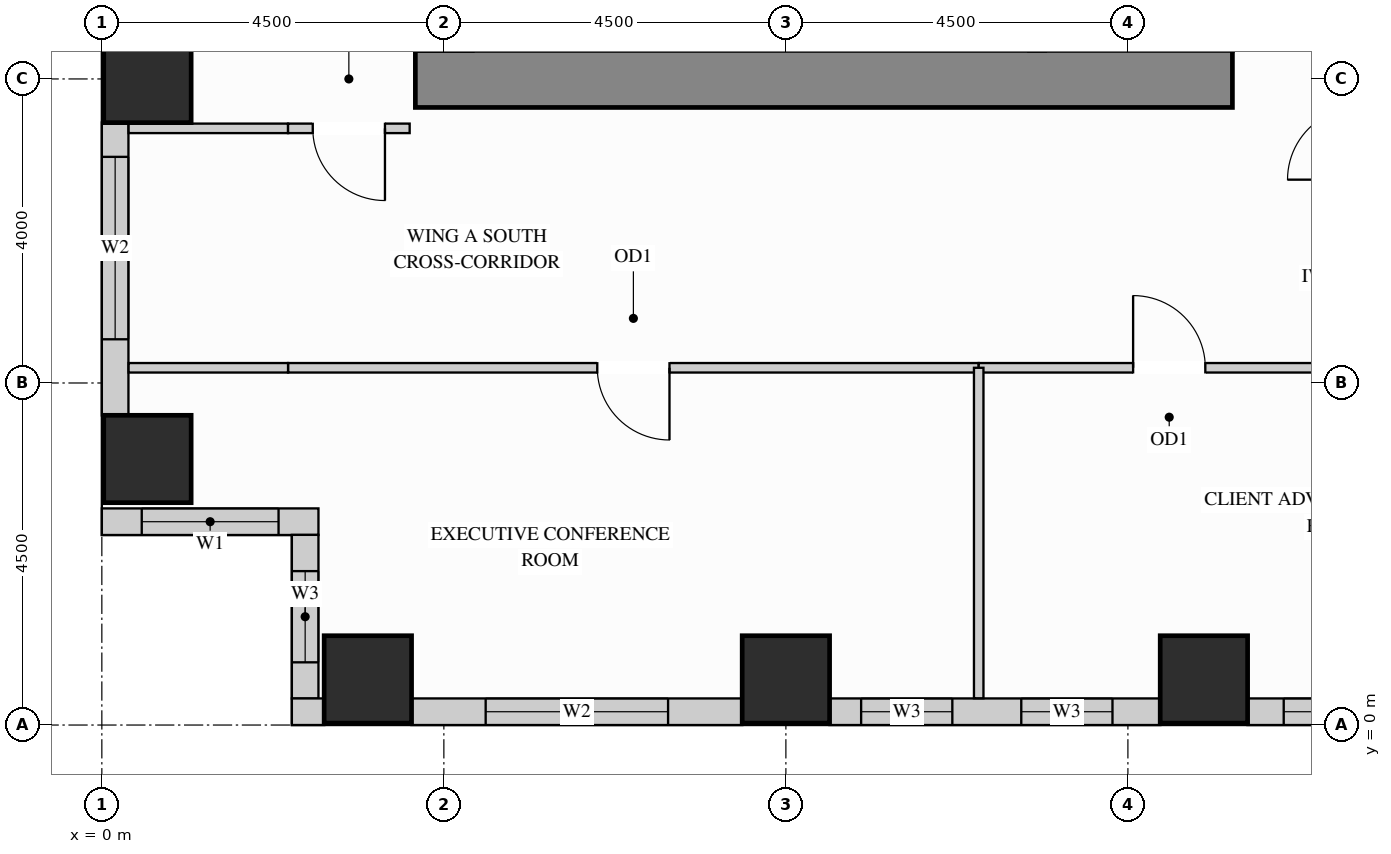
"""IFC4 building model, lengths in metres.
Left out: names, types, materials, properties, quantities, classifications, styles, units other than length and angle.
Written with IfcOpenShell. Run it as: python <this file> out.ifc"""

import sys

from ifc_helpers import new_model, si_unit, direction, frame, frame_2d, origin, origin_2d, place, context, subcontext, project, spatial, rectangle, extrude, source, transform, mapped, element, fill, save


model = new_model("IFC4")
c1 = context("Model", 3, precision=1e-05, world=origin(), true_north=direction((0.0, 1.0)))
c2 = subcontext(c1, "Body", "Model", "MODEL_VIEW")
j1 = project(units=[si_unit("LENGTHUNIT", "METRE"), si_unit("PLANEANGLEUNIT", "RADIAN")], contexts=[c1])
p1 = place(None, origin())
s1 = spatial("IfcSite", under=j1, at=p1, CompositionType="ELEMENT")
p2 = place(p1, origin())
s2 = spatial("IfcBuilding", under=s1, at=p2, CompositionType="ELEMENT")
p3 = place(p2, frame((0.0, 0.0, 124.2)))
s3 = spatial("IfcBuildingStorey", under=s2, at=p3, CompositionType="ELEMENT", Elevation=124.2)
m1 = source(origin(), c2, "Body", "SweptSolid", [
    extrude(rectangle(XDim=1.15, YDim=1.15, at=origin_2d()), origin(), (0.0, 0.0, 1.0), 3.38),
])
for number, where, z_axis, x_axis in (
    (1, (14.5, 0.6, 0.0), (0.0, 0.0, 1.0), (1.0, 0.0, 0.0)),
    (2, (3.5, 0.6, 0.0), (0.0, 0.0, 1.0), (1.0, 0.0, 0.0)),
    (3, (9.0, 0.6, 0.0), (0.0, 0.0, 1.0), (1.0, 0.0, 0.0)),
    (4, (0.6, 3.5, 0.0), (0.0, 0.0, 1.0), (1.0, 0.0, 0.0)),
    (5, (0.6, 8.5, 0.0), (0.0, 0.0, 1.0), (1.0, 0.0, 0.0)),
):
    element("IfcColumn", number, at=place(p3, frame(where, z_axis=z_axis, x_axis=x_axis)), inside=s3, PredefinedType="COLUMN", context=c2, shape_type="MappedRepresentation", body=[
        mapped(m1, transform((0.0, 0.0, 0.0), x_axis=(1.0, 0.0, 0.0), y_axis=(0.0, 1.0, 0.0), z_axis=(0.0, 0.0, 1.0))),
    ])
m2 = source(origin(), c2, "Body", "SweptSolid", [
    extrude(rectangle(XDim=10.75, YDim=0.75, at=frame_2d((5.375, 0.0))), origin(), (0.0, 0.0, 1.0), 3.38),
])
p4 = place(p3, frame((4.125, 8.5, 0.0), z_axis=(0.0, 0.0, 1.0), x_axis=(1.0, 0.0, 0.0)))
e6 = element("IfcWall", 6, at=p4, inside=s3, PredefinedType="SHEAR", context=c2, shape_type="MappedRepresentation", body=[
    mapped(m2, transform((0.0, 0.0, 0.0), x_axis=(1.0, 0.0, 0.0), y_axis=(0.0, 1.0, 0.0), z_axis=(0.0, 0.0, 1.0))),
])
p5 = place(p3, frame((0.175, 7.927, 0.0), z_axis=(0.0, 0.0, 1.0), x_axis=(0.0, -1.0, 0.0)))
e7 = element("IfcWall", 7, at=p5, inside=s3, PredefinedType="SOLIDWALL", context=c2, shape_type="SweptSolid", body=[
    extrude(rectangle(XDim=3.854, YDim=0.35, at=frame_2d((1.927, 0.0))), origin(), (0.0, 0.0, 1.0), 3.365),
])
p6 = place(p5, frame((0.452, 0.0, 0.78)))
e8 = element("IfcOpeningElement", 8, at=p6, cuts=e7, PredefinedType="OPENING", context=c2, shape_type="SweptSolid", body=[
    extrude(rectangle(XDim=2.4, YDim=2.1, at=frame_2d((1.2, 1.05))), frame((0.0, 0.185, 0.0), z_axis=(0.0, -1.0, 0.0), x_axis=(1.0, 0.0, 0.0)), (0.0, 0.0, 1.0), 0.37),
])
p7 = place(p3, frame((0.0, 2.675, 0.0), z_axis=(0.0, 0.0, 1.0), x_axis=(1.0, 0.0, 0.0)))
e9 = element("IfcWall", 9, at=p7, inside=s3, PredefinedType="SOLIDWALL", context=c2, shape_type="SweptSolid", body=[
    extrude(rectangle(XDim=2.85, YDim=0.35, at=frame_2d((1.425, 0.0))), origin(), (0.0, 0.0, 1.0), 3.365),
])
p8 = place(p7, frame((0.525, 0.0, 0.78)))
e10 = element("IfcOpeningElement", 10, at=p8, cuts=e9, PredefinedType="OPENING", context=c2, shape_type="SweptSolid", body=[
    extrude(rectangle(XDim=1.8, YDim=2.1, at=frame_2d((0.9, 1.05))), frame((0.0, 0.185, 0.0), z_axis=(0.0, -1.0, 0.0), x_axis=(1.0, 0.0, 0.0)), (0.0, 0.0, 1.0), 0.37),
])
p9 = place(p3, frame((2.675, 2.502, 0.0), z_axis=(0.0, 0.0, 1.0), x_axis=(0.0, -1.0, 0.0)))
e11 = element("IfcWall", 11, at=p9, inside=s3, PredefinedType="SOLIDWALL", context=c2, shape_type="SweptSolid", body=[
    extrude(rectangle(XDim=2.154, YDim=0.35, at=frame_2d((1.077, 0.0))), origin(), (0.0, 0.0, 1.0), 3.365),
])
p10 = place(p9, frame((0.477, 0.0, 0.78)))
e12 = element("IfcOpeningElement", 12, at=p10, cuts=e11, PredefinedType="OPENING", context=c2, shape_type="SweptSolid", body=[
    extrude(rectangle(XDim=1.2, YDim=2.1, at=frame_2d((0.6, 1.05))), frame((0.0, 0.185, 0.0), z_axis=(0.0, -1.0, 0.0), x_axis=(1.0, 0.0, 0.0)), (0.0, 0.0, 1.0), 0.37),
])
m3 = source(origin(), c2, "Body", "SweptSolid", [
    extrude(rectangle(XDim=0.427, YDim=0.35, at=frame_2d((0.213, 0.0))), origin(), (0.0, 0.0, 1.0), 3.365),
])
p11 = place(p3, frame((2.5, 0.175, 0.0), z_axis=(0.0, 0.0, 1.0), x_axis=(1.0, 0.0, 0.0)))
e13 = element("IfcWall", 13, at=p11, inside=s3, PredefinedType="SOLIDWALL", context=c2, shape_type="MappedRepresentation", body=[
    mapped(m3, transform((0.0, 0.0, 0.0), x_axis=(1.0, 0.0, 0.0), y_axis=(0.0, 1.0, 0.0), z_axis=(0.0, 0.0, 1.0))),
])
p12 = place(p3, frame((4.073, 0.175, 0.0), z_axis=(0.0, 0.0, 1.0), x_axis=(1.0, 0.0, 0.0)))
e14 = element("IfcWall", 14, at=p12, inside=s3, PredefinedType="SOLIDWALL", context=c2, shape_type="SweptSolid", body=[
    extrude(rectangle(XDim=4.354, YDim=0.35, at=frame_2d((2.177, 0.0))), origin(), (0.0, 0.0, 1.0), 3.365),
])
p13 = place(p12, frame((0.977, 0.0, 0.78)))
e15 = element("IfcOpeningElement", 15, at=p13, cuts=e14, PredefinedType="OPENING", context=c2, shape_type="SweptSolid", body=[
    extrude(rectangle(XDim=2.4, YDim=2.1, at=frame_2d((1.2, 1.05))), frame((0.0, 0.185, 0.0), z_axis=(0.0, -1.0, 0.0), x_axis=(1.0, 0.0, 0.0)), (0.0, 0.0, 1.0), 0.37),
])
p14 = place(p3, frame((9.573, 0.175, 0.0), z_axis=(0.0, 0.0, 1.0), x_axis=(1.0, 0.0, 0.0)))
e16 = element("IfcWall", 16, at=p14, inside=s3, PredefinedType="SOLIDWALL", context=c2, shape_type="SweptSolid", body=[
    extrude(rectangle(XDim=4.354, YDim=0.35, at=frame_2d((2.177, 0.0))), origin(), (0.0, 0.0, 1.0), 3.365),
])
p15 = place(p14, frame((0.417, 0.0, 0.78)))
e17 = element("IfcOpeningElement", 17, at=p15, cuts=e16, PredefinedType="OPENING", context=c2, shape_type="SweptSolid", body=[
    extrude(rectangle(XDim=1.2, YDim=2.1, at=frame_2d((0.6, 1.05))), frame((0.0, 0.185, 0.0), z_axis=(0.0, -1.0, 0.0), x_axis=(1.0, 0.0, 0.0)), (0.0, 0.0, 1.0), 0.37),
])
p16 = place(p14, frame((2.524, 0.0, 0.78)))
e18 = element("IfcOpeningElement", 18, at=p16, cuts=e16, PredefinedType="OPENING", context=c2, shape_type="SweptSolid", body=[
    extrude(rectangle(XDim=1.2, YDim=2.1, at=frame_2d((0.6, 1.05))), frame((0.0, 0.185, 0.0), z_axis=(0.0, -1.0, 0.0), x_axis=(1.0, 0.0, 0.0)), (0.0, 0.0, 1.0), 0.37),
])
p17 = place(p3, frame((15.073, 0.175, 0.0), z_axis=(0.0, 0.0, 1.0), x_axis=(1.0, 0.0, 0.0)))
e19 = element("IfcWall", 19, at=p17, inside=s3, PredefinedType="SOLIDWALL", context=c2, shape_type="SweptSolid", body=[
    extrude(rectangle(XDim=3.354, YDim=0.35, at=frame_2d((1.677, 0.0))), origin(), (0.0, 0.0, 1.0), 3.365),
])
p18 = place(p17, frame((0.477, 0.0, 0.78)))
e20 = element("IfcOpeningElement", 20, at=p18, cuts=e19, PredefinedType="OPENING", context=c2, shape_type="SweptSolid", body=[
    extrude(rectangle(XDim=2.4, YDim=2.1, at=frame_2d((1.2, 1.05))), frame((0.0, 0.185, 0.0), z_axis=(0.0, -1.0, 0.0), x_axis=(1.0, 0.0, 0.0)), (0.0, 0.0, 1.0), 0.37),
])
m4 = source(origin(), c2, "Body", "SweptSolid", [
    extrude(rectangle(XDim=2.098, YDim=0.125, at=frame_2d((1.049, 0.0))), origin(), (0.0, 0.0, 1.0), 3.365),
])
p19 = place(p3, frame((0.352, 7.85, 0.0), z_axis=(0.0, 0.0, 1.0), x_axis=(1.0, 0.0, 0.0)))
e21 = element("IfcWall", 21, at=p19, inside=s3, PredefinedType="PARTITIONING", context=c2, shape_type="MappedRepresentation", body=[
    mapped(m4, transform((0.0, 0.0, 0.0), x_axis=(1.0, 0.0, 0.0), y_axis=(0.0, 1.0, 0.0), z_axis=(0.0, 0.0, 1.0))),
])
p20 = place(p3, frame((2.45, 7.85, 0.0), z_axis=(0.0, 0.0, 1.0), x_axis=(1.0, 0.0, 0.0)))
e22 = element("IfcWall", 22, at=p20, inside=s3, PredefinedType="PARTITIONING", context=c2, shape_type="SweptSolid", body=[
    extrude(rectangle(XDim=1.6, YDim=0.125, at=frame_2d((0.8, 0.0))), origin(), (0.0, 0.0, 1.0), 3.365),
])
p21 = place(p20, frame((0.325, 0.0, 0.0)))
e23 = element("IfcOpeningElement", 23, at=p21, cuts=e22, PredefinedType="OPENING", context=c2, shape_type="SweptSolid", body=[
    extrude(rectangle(XDim=0.95, YDim=2.15, at=frame_2d((0.475, 1.075))), frame((0.0, 0.073, 0.0), z_axis=(0.0, -1.0, 0.0), x_axis=(1.0, 0.0, 0.0)), (0.0, 0.0, 1.0), 0.145),
])
p22 = place(p3, frame((2.45, 4.7, 0.0), z_axis=(0.0, 0.0, 1.0), x_axis=(1.0, 0.0, 0.0)))
e24 = element("IfcWall", 24, at=p22, inside=s3, PredefinedType="PARTITIONING", context=c2, shape_type="SweptSolid", body=[
    extrude(rectangle(XDim=9.087, YDim=0.125, at=frame_2d((4.543, 0.0))), origin(), (0.0, 0.0, 1.0), 2.828),
])
p23 = place(p22, frame((4.069, 0.0, 0.0)))
e25 = element("IfcOpeningElement", 25, at=p23, cuts=e24, PredefinedType="OPENING", context=c2, shape_type="SweptSolid", body=[
    extrude(rectangle(XDim=0.95, YDim=2.15, at=frame_2d((0.475, 1.075))), frame((0.0, 0.073, 0.0), z_axis=(0.0, -1.0, 0.0), x_axis=(1.0, 0.0, 0.0)), (0.0, 0.0, 1.0), 0.145),
])
p24 = place(p3, frame((11.537, 4.7, 0.0), z_axis=(0.0, 0.0, 1.0), x_axis=(1.0, 0.0, 0.0)))
e26 = element("IfcWall", 26, at=p24, inside=s3, PredefinedType="PARTITIONING", context=c2, shape_type="SweptSolid", body=[
    extrude(rectangle(XDim=5.013, YDim=0.125, at=frame_2d((2.506, 0.0))), origin(), (0.0, 0.0, 1.0), 2.828),
])
p25 = place(p24, frame((2.031, 0.0, 0.0)))
e27 = element("IfcOpeningElement", 27, at=p25, cuts=e26, PredefinedType="OPENING", context=c2, shape_type="SweptSolid", body=[
    extrude(rectangle(XDim=0.95, YDim=2.15, at=frame_2d((0.475, 1.075))), frame((0.0, 0.073, 0.0), z_axis=(0.0, -1.0, 0.0), x_axis=(1.0, 0.0, 0.0)), (0.0, 0.0, 1.0), 0.145),
])
m5 = source(origin(), c2, "Body", "SweptSolid", [
    extrude(rectangle(XDim=2.098, YDim=0.125, at=frame_2d((1.049, 0.0))), origin(), (0.0, 0.0, 1.0), 2.828),
])
p26 = place(p3, frame((0.352, 4.7, 0.0), z_axis=(0.0, 0.0, 1.0), x_axis=(1.0, 0.0, 0.0)))
e28 = element("IfcWall", 28, at=p26, inside=s3, PredefinedType="PARTITIONING", context=c2, shape_type="MappedRepresentation", body=[
    mapped(m5, transform((0.0, 0.0, 0.0), x_axis=(1.0, 0.0, 0.0), y_axis=(0.0, 1.0, 0.0), z_axis=(0.0, 0.0, 1.0))),
])
m6 = source(origin(), c2, "Body", "SweptSolid", [
    extrude(rectangle(XDim=4.348, YDim=0.125, at=frame_2d((2.174, 0.0))), origin(), (0.0, 0.0, 1.0), 3.365),
])
p27 = place(p3, frame((11.537, 0.352, 0.0), z_axis=(0.0, 0.0, 1.0), x_axis=(0.0, 1.0, 0.0)))
e29 = element("IfcWall", 29, at=p27, inside=s3, PredefinedType="PARTITIONING", context=c2, shape_type="MappedRepresentation", body=[
    mapped(m6, transform((0.0, 0.0, 0.0), x_axis=(1.0, 0.0, 0.0), y_axis=(0.0, 1.0, 0.0), z_axis=(0.0, 0.0, 1.0))),
])
m7 = source(origin(), c2, "Body", "SweptSolid", [
    extrude(rectangle(XDim=0.95, YDim=2.15, at=frame_2d((0.475, 1.075))), frame((0.0, 0.025, 0.0), z_axis=(0.0, -1.0, 0.0), x_axis=(1.0, 0.0, 0.0)), (0.0, 0.0, 1.0), 0.05),
])
p28 = place(p23, origin())
e30 = element("IfcDoor", 30, at=p28, inside=s3, OperationType="SINGLE_SWING_RIGHT", PredefinedType="DOOR", context=c2, shape_type="MappedRepresentation", body=[
    mapped(m7, transform((0.0, 0.0, 0.0), x_axis=(1.0, 0.0, 0.0), y_axis=(0.0, 1.0, 0.0), z_axis=(0.0, 0.0, 1.0))),
])
fill(e25, e30)
p29 = place(p25, origin())
e31 = element("IfcDoor", 31, at=p29, inside=s3, OperationType="SINGLE_SWING_LEFT", PredefinedType="DOOR", context=c2, shape_type="MappedRepresentation", body=[
    mapped(m7, transform((0.0, 0.0, 0.0), x_axis=(1.0, 0.0, 0.0), y_axis=(0.0, 1.0, 0.0), z_axis=(0.0, 0.0, 1.0))),
])
fill(e27, e31)
p30 = place(p21, origin())
e32 = element("IfcDoor", 32, at=p30, inside=s3, OperationType="SINGLE_SWING_RIGHT", PredefinedType="DOOR", context=c2, shape_type="MappedRepresentation", body=[
    mapped(m7, transform((0.0, 0.0, 0.0), x_axis=(1.0, 0.0, 0.0), y_axis=(0.0, 1.0, 0.0), z_axis=(0.0, 0.0, 1.0))),
])
fill(e23, e32)
m8 = source(origin(), c2, "Body", "SweptSolid", [
    extrude(rectangle(XDim=1.8, YDim=2.1, at=frame_2d((0.9, 1.05))), frame((0.0, 0.03, 0.0), z_axis=(0.0, -1.0, 0.0), x_axis=(1.0, 0.0, 0.0)), (0.0, 0.0, 1.0), 0.06),
])
p31 = place(p8, origin())
e33 = element("IfcWindow", 33, at=p31, inside=s3, PartitioningType="SINGLE_PANEL", PredefinedType="WINDOW", context=c2, shape_type="MappedRepresentation", body=[
    mapped(m8, transform((0.0, 0.0, 0.0), x_axis=(1.0, 0.0, 0.0), y_axis=(0.0, 1.0, 0.0), z_axis=(0.0, 0.0, 1.0))),
])
fill(e10, e33)
m9 = source(origin(), c2, "Body", "SweptSolid", [
    extrude(rectangle(XDim=2.4, YDim=2.1, at=frame_2d((1.2, 1.05))), frame((0.0, 0.03, 0.0), z_axis=(0.0, -1.0, 0.0), x_axis=(1.0, 0.0, 0.0)), (0.0, 0.0, 1.0), 0.06),
])
p32 = place(p6, origin())
e34 = element("IfcWindow", 34, at=p32, inside=s3, PartitioningType="SINGLE_PANEL", PredefinedType="WINDOW", context=c2, shape_type="MappedRepresentation", body=[
    mapped(m9, transform((0.0, 0.0, 0.0), x_axis=(1.0, 0.0, 0.0), y_axis=(0.0, 1.0, 0.0), z_axis=(0.0, 0.0, 1.0))),
])
fill(e8, e34)
p33 = place(p13, origin())
e35 = element("IfcWindow", 35, at=p33, inside=s3, PartitioningType="SINGLE_PANEL", PredefinedType="WINDOW", context=c2, shape_type="MappedRepresentation", body=[
    mapped(m9, transform((0.0, 0.0, 0.0), x_axis=(1.0, 0.0, 0.0), y_axis=(0.0, 1.0, 0.0), z_axis=(0.0, 0.0, 1.0))),
])
fill(e15, e35)
p34 = place(p18, origin())
e36 = element("IfcWindow", 36, at=p34, inside=s3, PartitioningType="SINGLE_PANEL", PredefinedType="WINDOW", context=c2, shape_type="MappedRepresentation", body=[
    mapped(m9, transform((0.0, 0.0, 0.0), x_axis=(1.0, 0.0, 0.0), y_axis=(0.0, 1.0, 0.0), z_axis=(0.0, 0.0, 1.0))),
])
fill(e20, e36)
m10 = source(origin(), c2, "Body", "SweptSolid", [
    extrude(rectangle(XDim=1.2, YDim=2.1, at=frame_2d((0.6, 1.05))), frame((0.0, 0.03, 0.0), z_axis=(0.0, -1.0, 0.0), x_axis=(1.0, 0.0, 0.0)), (0.0, 0.0, 1.0), 0.06),
])
p35 = place(p10, origin())
e37 = element("IfcWindow", 37, at=p35, inside=s3, PartitioningType="SINGLE_PANEL", PredefinedType="WINDOW", context=c2, shape_type="MappedRepresentation", body=[
    mapped(m10, transform((0.0, 0.0, 0.0), x_axis=(1.0, 0.0, 0.0), y_axis=(0.0, 1.0, 0.0), z_axis=(0.0, 0.0, 1.0))),
])
fill(e12, e37)
p36 = place(p15, origin())
e38 = element("IfcWindow", 38, at=p36, inside=s3, PartitioningType="SINGLE_PANEL", PredefinedType="WINDOW", context=c2, shape_type="MappedRepresentation", body=[
    mapped(m10, transform((0.0, 0.0, 0.0), x_axis=(1.0, 0.0, 0.0), y_axis=(0.0, 1.0, 0.0), z_axis=(0.0, 0.0, 1.0))),
])
fill(e17, e38)
p37 = place(p16, origin())
e39 = element("IfcWindow", 39, at=p37, inside=s3, PartitioningType="SINGLE_PANEL", PredefinedType="WINDOW", context=c2, shape_type="MappedRepresentation", body=[
    mapped(m10, transform((0.0, 0.0, 0.0), x_axis=(1.0, 0.0, 0.0), y_axis=(0.0, 1.0, 0.0), z_axis=(0.0, 0.0, 1.0))),
])
fill(e18, e39)
save(model, sys.argv[1])
